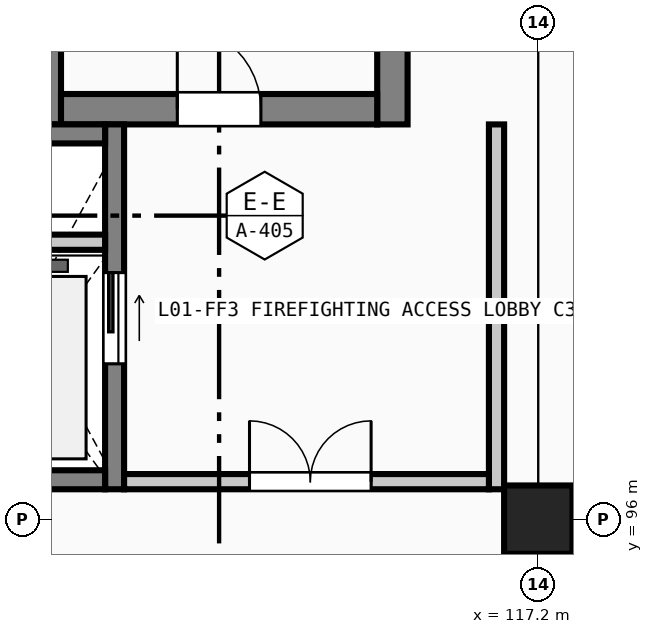
"""IFC4 building model, lengths in metres.
Left out: names, types, materials, properties, quantities, classifications, styles, units other than length and angle.
Written with IfcOpenShell. Run it as: python <this file> out.ifc"""

import sys

from ifc_helpers import new_model, si_unit, direction, frame, frame_2d, origin, origin_2d, place, context, subcontext, project, spatial, rectangle, extrude, element, fill, save


model = new_model("IFC4")
c1 = context("Model", 3, precision=1e-05, world=origin(), true_north=direction((0.0, 1.0)))
c2 = subcontext(c1, "Body", "Model", "MODEL_VIEW")
j1 = project(units=[si_unit("LENGTHUNIT", "METRE"), si_unit("PLANEANGLEUNIT", "RADIAN")], contexts=[c1])
p1 = place(None, origin())
s1 = spatial("IfcSite", under=j1, at=p1, CompositionType="ELEMENT")
p2 = place(p1, origin())
s2 = spatial("IfcBuilding", under=s1, at=p2, CompositionType="ELEMENT")
p3 = place(p2, frame((0.0, 0.0, 4.8)))
s3 = spatial("IfcBuildingStorey", under=s2, at=p3, CompositionType="ELEMENT", Elevation=4.8)
p4 = place(p3, frame((117.2, 96.0, 0.0), z_axis=(0.0, 0.0, 1.0), x_axis=(1.0, 0.0, 0.0)))
e1 = element("IfcColumn", 1, at=p4, inside=s3, PredefinedType="COLUMN", context=c2, shape_type="SweptSolid", body=[
    extrude(rectangle(XDim=0.9, YDim=0.9, at=origin_2d()), origin(), (0.0, 0.0, 1.0), 4.8),
])
for number, where, z_axis, x_axis in (
    (2, (110.72, 101.2, 0.0), (0.0, 0.0, 1.0), (0.0, 1.0, 0.0)),
    (3, (115.28, 110.4, 0.0), (0.0, 0.0, 1.0), (0.0, -1.0, 0.0)),
):
    element("IfcWall", number, at=place(p3, frame(where, z_axis=z_axis, x_axis=x_axis)), inside=s3, PredefinedType="SHEAR", context=c2, shape_type="SweptSolid", body=[
        extrude(rectangle(XDim=9.2, YDim=0.4, at=frame_2d((4.6, 0.0))), origin(), (0.0, 0.0, 1.0), 4.525),
    ])
p5 = place(p3, frame((115.08, 101.4, 0.0), z_axis=(0.0, 0.0, 1.0), x_axis=(-1.0, 0.0, 0.0)))
e4 = element("IfcWall", 4, at=p5, inside=s3, PredefinedType="SHEAR", context=c2, shape_type="SweptSolid", body=[
    extrude(rectangle(XDim=4.16, YDim=0.4, at=frame_2d((2.08, 0.0))), origin(), (0.0, 0.0, 1.0), 4.525),
])
p6 = place(p5, frame((1.53, 0.0, 0.0)))
e5 = element("IfcOpeningElement", 5, at=p6, cuts=e4, PredefinedType="OPENING", context=c2, shape_type="SweptSolid", body=[
    extrude(rectangle(XDim=1.1, YDim=2.2, at=frame_2d((0.55, 1.1))), frame((0.0, 0.21, 0.0), z_axis=(0.0, -1.0, 0.0), x_axis=(1.0, 0.0, 0.0)), (0.0, 0.0, 1.0), 0.42),
])
p7 = place(p3, frame((111.625, 101.2, 0.0), z_axis=(0.0, 0.0, 1.0), x_axis=(0.0, -1.0, 0.0)))
e6 = element("IfcWall", 6, at=p7, inside=s3, PredefinedType="SOLIDWALL", context=c2, shape_type="SweptSolid", body=[
    extrude(rectangle(XDim=4.8, YDim=0.25, at=frame_2d((2.4, 0.0))), origin(), (0.0, 0.0, 1.0), 4.525),
])
p8 = place(p7, frame((1.95, 0.0, 0.0)))
e7 = element("IfcOpeningElement", 7, at=p8, cuts=e6, PredefinedType="OPENING", context=c2, shape_type="SweptSolid", body=[
    extrude(rectangle(XDim=1.2, YDim=2.2, at=frame_2d((0.6, 1.1))), frame((0.0, 0.135, 0.0), z_axis=(0.0, -1.0, 0.0), x_axis=(1.0, 0.0, 0.0)), (0.0, 0.0, 1.0), 0.27),
])
for number, where, z_axis, x_axis in (
    (8, (111.5, 96.525, 0.0), (0.0, 0.0, 1.0), (-1.0, 0.0, 0.0)),
    (9, (109.4, 101.075, 0.0), (0.0, 0.0, 1.0), (1.0, 0.0, 0.0)),
):
    element("IfcWall", number, at=place(p3, frame(where, z_axis=z_axis, x_axis=x_axis)), inside=s3, PredefinedType="SOLIDWALL", context=c2, shape_type="SweptSolid", body=[
        extrude(rectangle(XDim=2.1, YDim=0.25, at=frame_2d((1.05, 0.0))), origin(), (0.0, 0.0, 1.0), 4.525),
    ])
p9 = place(p3, frame((109.4, 99.65, 0.0), z_axis=(0.0, 0.0, 1.0), x_axis=(1.0, 0.0, 0.0)))
e10 = element("IfcWall", 10, at=p9, inside=s3, PredefinedType="SOLIDWALL", context=c2, shape_type="SweptSolid", body=[
    extrude(rectangle(XDim=2.1, YDim=0.2, at=frame_2d((1.05, 0.0))), origin(), (0.0, 0.0, 1.0), 4.525),
])
p10 = place(p3, frame((116.65, 101.2, 0.0), z_axis=(0.0, 0.0, 1.0), x_axis=(0.0, -1.0, 0.0)))
e11 = element("IfcWall", 11, at=p10, inside=s3, PredefinedType="SOLIDWALL", context=c2, shape_type="SweptSolid", body=[
    extrude(rectangle(XDim=4.8, YDim=0.2, at=frame_2d((2.4, 0.0))), origin(), (0.0, 0.0, 1.0), 4.525),
])
p11 = place(p3, frame((116.55, 96.5, 0.0), z_axis=(0.0, 0.0, 1.0), x_axis=(-1.0, 0.0, 0.0)))
e12 = element("IfcWall", 12, at=p11, inside=s3, PredefinedType="SOLIDWALL", context=c2, shape_type="SweptSolid", body=[
    extrude(rectangle(XDim=4.8, YDim=0.2, at=frame_2d((2.4, 0.0))), origin(), (0.0, 0.0, 1.0), 4.525),
])
p12 = place(p11, frame((1.55, 0.0, 0.0)))
e13 = element("IfcOpeningElement", 13, at=p12, cuts=e12, PredefinedType="OPENING", context=c2, shape_type="SweptSolid", body=[
    extrude(rectangle(XDim=1.6, YDim=2.2, at=frame_2d((0.8, 1.1))), frame((0.0, 0.11, 0.0), z_axis=(0.0, -1.0, 0.0), x_axis=(1.0, 0.0, 0.0)), (0.0, 0.0, 1.0), 0.22),
])
p13 = place(p6, frame((1.1, 0.0, 0.0), z_axis=(0.0, 0.0, 1.0), x_axis=(-1.0, 0.0, 0.0)))
e14 = element("IfcDoor", 14, at=p13, inside=s3, OperationType="SINGLE_SWING_LEFT", PredefinedType="DOOR", context=c2, shape_type="SweptSolid", body=[
    extrude(rectangle(XDim=1.1, YDim=2.2, at=frame_2d((0.55, 1.1))), frame((0.0, 0.025, 0.0), z_axis=(0.0, -1.0, 0.0), x_axis=(1.0, 0.0, 0.0)), (0.0, 0.0, 1.0), 0.05),
])
fill(e5, e14)
p14 = place(p8, origin())
e15 = element("IfcDoor", 15, at=p14, inside=s3, OperationType="SLIDING_TO_LEFT", PredefinedType="DOOR", context=c2, shape_type="SweptSolid", body=[
    extrude(rectangle(XDim=1.2, YDim=2.2, at=frame_2d((0.6, 1.1))), frame((0.0, 0.025, 0.0), z_axis=(0.0, -1.0, 0.0), x_axis=(1.0, 0.0, 0.0)), (0.0, 0.0, 1.0), 0.05),
])
fill(e7, e15)
p15 = place(p12, frame((1.6, 0.0, 0.0), z_axis=(0.0, 0.0, 1.0), x_axis=(-1.0, 0.0, 0.0)))
e16 = element("IfcDoor", 16, at=p15, inside=s3, OperationType="DOUBLE_DOOR_SINGLE_SWING", PredefinedType="DOOR", context=c2, shape_type="SweptSolid", body=[
    extrude(rectangle(XDim=1.6, YDim=2.2, at=frame_2d((0.8, 1.1))), frame((0.0, 0.025, 0.0), z_axis=(0.0, -1.0, 0.0), x_axis=(1.0, 0.0, 0.0)), (0.0, 0.0, 1.0), 0.05),
])
fill(e13, e16)
save(model, sys.argv[1])
